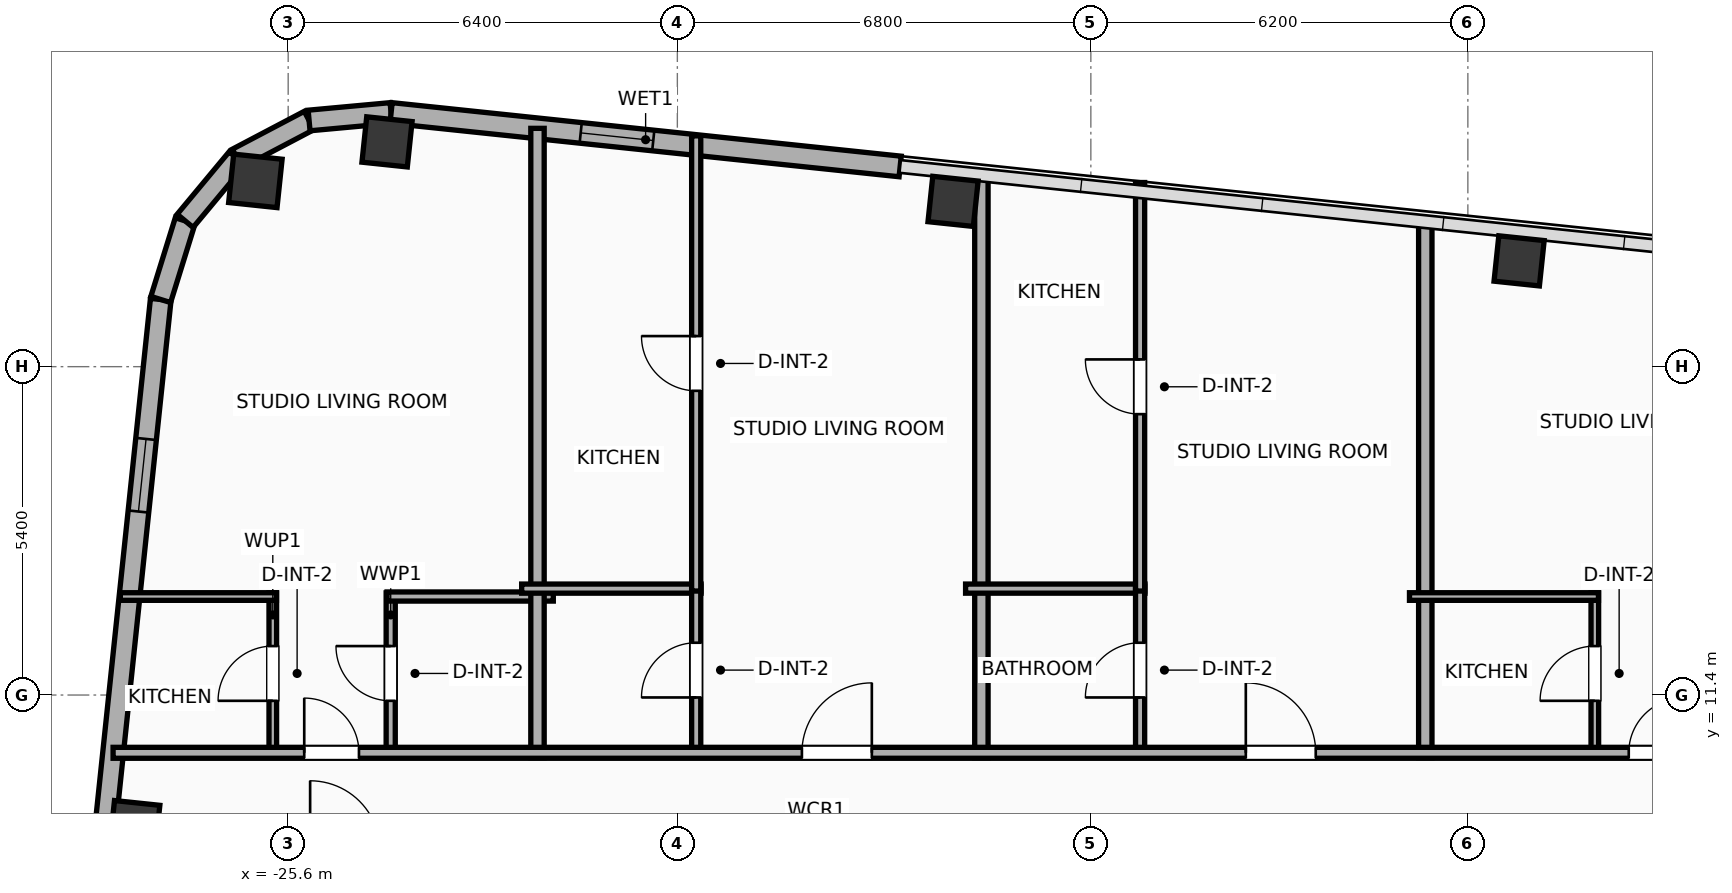
"""IFC4 building model, lengths in metres.
Left out: names, types, materials, properties, quantities, classifications, styles, units other than length and angle.
Written with IfcOpenShell. Run it as: python <this file> out.ifc"""

import sys

from ifc_helpers import new_model, si_unit, direction, frame, frame_2d, origin, origin_2d, place, context, subcontext, project, spatial, rectangle, hollow_rectangle, hollow_circle, extrude, element, fill, save


model = new_model("IFC4")
c1 = context("Model", 3, precision=1e-05, world=origin(), true_north=direction((0.0, 1.0)))
c2 = subcontext(c1, "Body", "Model", "MODEL_VIEW")
j1 = project(units=[si_unit("LENGTHUNIT", "METRE"), si_unit("PLANEANGLEUNIT", "RADIAN")], contexts=[c1])
p1 = place(None, origin())
s1 = spatial("IfcSite", under=j1, at=p1, CompositionType="ELEMENT")
p2 = place(p1, origin())
s2 = spatial("IfcBuilding", under=s1, at=p2, CompositionType="ELEMENT")
p3 = place(p2, frame((0.0, 0.0, 263.9)))
s3 = spatial("IfcBuildingStorey", under=s2, at=p3, CompositionType="ELEMENT", Elevation=263.9)
for number, where, z_axis, x_axis in (
    (1, (-5.357, 18.54, 0.0), (0.0, 0.0, 1.0), (0.995, -0.105, 0.0)),
    (2, (-14.666, 19.518, 0.0), (0.0, 0.0, 1.0), (0.995, -0.105, 0.0)),
    (3, (-23.975, 20.497, 0.0), (0.0, 0.0, 1.0), (0.995, -0.105, 0.0)),
):
    element("IfcColumn", number, at=place(p3, frame(where, z_axis=z_axis, x_axis=x_axis)), inside=s3, PredefinedType="COLUMN", context=c2, shape_type="SweptSolid", body=[
        extrude(hollow_rectangle(XDim=0.75, YDim=0.75, WallThickness=0.025, at=origin_2d()), origin(), (0.0, 0.0, 1.0), 3.9),
    ])
p4 = place(p3, frame((-26.139, 19.855, 0.0), z_axis=(0.0, 0.0, 1.0), x_axis=(0.994521895368, -0.104528463268, 0.0)))
e4 = element("IfcColumn", 4, at=p4, inside=s3, PredefinedType="COLUMN", context=c2, shape_type="SweptSolid", body=[
    extrude(hollow_circle(Radius=0.4, WallThickness=0.028, at=origin_2d()), origin(), (0.0, 0.0, 1.0), 3.9),
])
p5 = place(p3, frame((-28.123, 9.252, 0.0), z_axis=(0.0, 0.0, 1.0), x_axis=(0.994521895368, -0.104528463268, 0.0)))
e5 = element("IfcColumn", 5, at=p5, inside=s3, PredefinedType="COLUMN", context=c2, shape_type="SweptSolid", body=[
    extrude(hollow_rectangle(XDim=0.75, YDim=0.75, WallThickness=0.025, at=origin_2d()), origin(), (0.0, 0.0, 1.0), 3.9),
])
p6 = place(p3, frame((-30.87, -12.296, 0.0), z_axis=(0.0, 0.0, 1.0), x_axis=(0.104533282919, 0.994521388791, 0.0)))
e6 = element("IfcWall", 6, at=p6, inside=s3, PredefinedType="ELEMENTEDWALL", context=c2, shape_type="SweptSolid", body=[
    extrude(rectangle(XDim=30.366, YDim=0.34, at=frame_2d((15.183, 0.0))), origin(), (0.0, 0.0, 1.0), 3.65),
])
p7 = place(p6, frame((5.842, 0.0, 0.75)))
e7 = element("IfcOpeningElement", 7, at=p7, cuts=e6, PredefinedType="OPENING", context=c2, shape_type="SweptSolid", body=[
    extrude(rectangle(XDim=1.8, YDim=2.1, at=frame_2d((0.9, 1.05))), frame((0.0, 0.18, 0.0), z_axis=(0.0, -1.0, 0.0), x_axis=(1.0, 0.0, 0.0)), (0.0, 0.0, 1.0), 0.36),
])
p8 = place(p6, frame((26.861, 0.0, 0.75)))
e8 = element("IfcOpeningElement", 8, at=p8, cuts=e6, PredefinedType="OPENING", context=c2, shape_type="SweptSolid", body=[
    extrude(rectangle(XDim=1.2, YDim=2.05, at=frame_2d((0.6, 1.025))), frame((0.0, 0.18, 0.0), z_axis=(0.0, -1.0, 0.0), x_axis=(1.0, 0.0, 0.0)), (0.0, 0.0, 1.0), 0.36),
])
p9 = place(p6, frame((16.311, 0.0, 0.75)))
e9 = element("IfcOpeningElement", 9, at=p9, cuts=e6, PredefinedType="OPENING", context=c2, shape_type="SweptSolid", body=[
    extrude(rectangle(XDim=1.2, YDim=2.05, at=frame_2d((0.6, 1.025))), frame((0.0, 0.18, 0.0), z_axis=(0.0, -1.0, 0.0), x_axis=(1.0, 0.0, 0.0)), (0.0, 0.0, 1.0), 0.36),
])
p10 = place(p3, frame((-27.696, 17.905, 0.0), z_axis=(0.0, 0.0, 1.0), x_axis=(0.296416228123, 0.955058856671, 0.0)))
e10 = element("IfcWall", 10, at=p10, inside=s3, PredefinedType="ELEMENTEDWALL", context=c2, shape_type="SweptSolid", body=[
    extrude(rectangle(XDim=1.354, YDim=0.34, at=frame_2d((0.677, 0.0))), origin(), (0.0, 0.0, 1.0), 3.65),
])
p11 = place(p3, frame((-27.294, 19.198, 0.0), z_axis=(0.0, 0.0, 1.0), x_axis=(0.639501603217, 0.768789762863, 0.0)))
e11 = element("IfcWall", 11, at=p11, inside=s3, PredefinedType="ELEMENTEDWALL", context=c2, shape_type="SweptSolid", body=[
    extrude(rectangle(XDim=1.337, YDim=0.34, at=frame_2d((0.668, 0.0))), origin(), (0.0, 0.0, 1.0), 3.65),
])
p12 = place(p3, frame((-26.439, 20.226, 0.0), z_axis=(0.0, 0.0, 1.0), x_axis=(0.884922182678, 0.465738908193, 0.0)))
e12 = element("IfcWall", 12, at=p12, inside=s3, PredefinedType="ELEMENTEDWALL", context=c2, shape_type="SweptSolid", body=[
    extrude(rectangle(XDim=1.337, YDim=0.34, at=frame_2d((0.668, 0.0))), origin(), (0.0, 0.0, 1.0), 3.65),
])
p13 = place(p3, frame((-25.256, 20.848, 0.0), z_axis=(0.0, 0.0, 1.0), x_axis=(0.995813013343, 0.091413579172, 0.0)))
e13 = element("IfcWall", 13, at=p13, inside=s3, PredefinedType="ELEMENTEDWALL", context=c2, shape_type="SweptSolid", body=[
    extrude(rectangle(XDim=1.354, YDim=0.34, at=frame_2d((0.677, 0.0))), origin(), (0.0, 0.0, 1.0), 3.65),
])
p14 = place(p3, frame((-23.908, 20.972, 0.0), z_axis=(0.0, 0.0, 1.0), x_axis=(0.994522285292, -0.104524753323, 0.0)))
e14 = element("IfcWall", 14, at=p14, inside=s3, PredefinedType="ELEMENTEDWALL", context=c2, shape_type="SweptSolid", body=[
    extrude(rectangle(XDim=8.418, YDim=0.34, at=frame_2d((4.209, 0.0))), origin(), (0.0, 0.0, 1.0), 3.65),
])
p15 = place(p14, frame((3.135, 0.0, 0.75)))
e15 = element("IfcOpeningElement", 15, at=p15, cuts=e14, PredefinedType="OPENING", context=c2, shape_type="SweptSolid", body=[
    extrude(rectangle(XDim=1.2, YDim=2.05, at=frame_2d((0.6, 1.025))), frame((0.0, 0.18, 0.0), z_axis=(0.0, -1.0, 0.0), x_axis=(1.0, 0.0, 0.0)), (0.0, 0.0, 1.0), 0.36),
])
p16 = place(p3, frame((-25.853, 10.43, 0.0), z_axis=(0.0, 0.0, 1.0), x_axis=(0.0, 1.0, 0.0)))
e16 = element("IfcWall", 16, at=p16, inside=s3, PredefinedType="PARTITIONING", context=c2, shape_type="SweptSolid", body=[
    extrude(rectangle(XDim=2.65, YDim=0.125, at=frame_2d((1.325, 0.0))), origin(), (0.0, 0.0, 1.0), 3.65),
])
p17 = place(p16, frame((0.875, 0.0, 0.0)))
e17 = element("IfcOpeningElement", 17, at=p17, cuts=e16, PredefinedType="OPENING", context=c2, shape_type="SweptSolid", body=[
    extrude(rectangle(XDim=0.9, YDim=2.05, at=frame_2d((0.45, 1.025))), frame((0.0, 0.073, 0.0), z_axis=(0.0, -1.0, 0.0), x_axis=(1.0, 0.0, 0.0)), (0.0, 0.0, 1.0), 0.145),
])
p18 = place(p3, frame((-23.914, 10.43, 0.0), z_axis=(0.0, 0.0, 1.0), x_axis=(0.0, 1.0, 0.0)))
e18 = element("IfcWall", 18, at=p18, inside=s3, PredefinedType="PLUMBINGWALL", context=c2, shape_type="SweptSolid", body=[
    extrude(rectangle(XDim=2.65, YDim=0.15, at=frame_2d((1.325, 0.0))), origin(), (0.0, 0.0, 1.0), 3.65),
])
p19 = place(p18, frame((0.875, 0.0, 0.0)))
e19 = element("IfcOpeningElement", 19, at=p19, cuts=e18, PredefinedType="OPENING", context=c2, shape_type="SweptSolid", body=[
    extrude(rectangle(XDim=0.9, YDim=2.05, at=frame_2d((0.45, 1.025))), frame((0.0, 0.085, 0.0), z_axis=(0.0, -1.0, 0.0), x_axis=(1.0, 0.0, 0.0)), (0.0, 0.0, 1.0), 0.17),
])
p20 = place(p3, frame((-28.36, 13.02, 0.0), z_axis=(0.0, 0.0, 1.0), x_axis=(1.0, 0.0, 0.0)))
e20 = element("IfcWall", 20, at=p20, inside=s3, PredefinedType="PARTITIONING", context=c2, shape_type="SweptSolid", body=[
    extrude(rectangle(XDim=2.567, YDim=0.125, at=frame_2d((1.284, 0.0))), origin(), (0.0, 0.0, 1.0), 3.65),
])
p21 = place(p3, frame((-23.974, 13.02, 0.0), z_axis=(0.0, 0.0, 1.0), x_axis=(1.0, 0.0, 0.0)))
e21 = element("IfcWall", 21, at=p21, inside=s3, PredefinedType="PLUMBINGWALL", context=c2, shape_type="SweptSolid", body=[
    extrude(rectangle(XDim=2.734, YDim=0.15, at=frame_2d((1.367, 0.0))), origin(), (0.0, 0.0, 1.0), 3.65),
])
p22 = place(p3, frame((-21.5, 10.37, 0.0), z_axis=(0.0, 0.0, 1.0), x_axis=(0.0, 1.0, 0.0)))
e22 = element("IfcWall", 22, at=p22, inside=s3, PredefinedType="PARTITIONING", context=c2, shape_type="SweptSolid", body=[
    extrude(rectangle(XDim=10.349, YDim=0.22, at=frame_2d((5.174, 0.0))), origin(), (0.0, 0.0, 1.0), 3.09),
])
p23 = place(p3, frame((-21.76, 13.15, 0.0), z_axis=(0.0, 0.0, 1.0), x_axis=(1.0, 0.0, 0.0)))
e23 = element("IfcWall", 23, at=p23, inside=s3, PredefinedType="PLUMBINGWALL", context=c2, shape_type="SweptSolid", body=[
    extrude(rectangle(XDim=2.95, YDim=0.15, at=frame_2d((1.475, 0.0))), origin(), (0.0, 0.0, 1.0), 3.65),
])
p24 = place(p3, frame((-18.89, 10.43, 0.0), z_axis=(0.0, 0.0, 1.0), x_axis=(0.0, 1.0, 0.0)))
e24 = element("IfcWall", 24, at=p24, inside=s3, PredefinedType="PLUMBINGWALL", context=c2, shape_type="SweptSolid", body=[
    extrude(rectangle(XDim=2.76, YDim=0.15, at=frame_2d((1.38, 0.0))), origin(), (0.0, 0.0, 1.0), 3.65),
])
p25 = place(p24, frame((0.93, 0.0, 0.0)))
e25 = element("IfcOpeningElement", 25, at=p25, cuts=e24, PredefinedType="OPENING", context=c2, shape_type="SweptSolid", body=[
    extrude(rectangle(XDim=0.9, YDim=2.05, at=frame_2d((0.45, 1.025))), frame((0.0, 0.085, 0.0), z_axis=(0.0, -1.0, 0.0), x_axis=(1.0, 0.0, 0.0)), (0.0, 0.0, 1.0), 0.17),
])
p26 = place(p3, frame((-18.89, 13.11, 0.0), z_axis=(0.0, 0.0, 1.0), x_axis=(0.0, 1.0, 0.0)))
e26 = element("IfcWall", 26, at=p26, inside=s3, PredefinedType="PLUMBINGWALL", context=c2, shape_type="SweptSolid", body=[
    extrude(rectangle(XDim=7.486, YDim=0.15, at=frame_2d((3.743, 0.0))), origin(), (0.0, 0.0, 1.0), 3.65),
])
p27 = place(p26, frame((3.293, 0.0, 0.0)))
e27 = element("IfcOpeningElement", 27, at=p27, cuts=e26, PredefinedType="OPENING", context=c2, shape_type="SweptSolid", body=[
    extrude(rectangle(XDim=0.9, YDim=2.05, at=frame_2d((0.45, 1.025))), frame((0.0, 0.085, 0.0), z_axis=(0.0, -1.0, 0.0), x_axis=(1.0, 0.0, 0.0)), (0.0, 0.0, 1.0), 0.17),
])
p28 = place(p3, frame((-14.2, 10.37, 0.0), z_axis=(0.0, 0.0, 1.0), x_axis=(0.0, 1.0, 0.0)))
e28 = element("IfcWall", 28, at=p28, inside=s3, PredefinedType="PARTITIONING", context=c2, shape_type="SweptSolid", body=[
    extrude(rectangle(XDim=9.582, YDim=0.22, at=frame_2d((4.791, 0.0))), origin(), (0.0, 0.0, 1.0), 3.65),
])
p29 = place(p3, frame((-14.46, 13.15, 0.0), z_axis=(0.0, 0.0, 1.0), x_axis=(1.0, 0.0, 0.0)))
e29 = element("IfcWall", 29, at=p29, inside=s3, PredefinedType="PLUMBINGWALL", context=c2, shape_type="SweptSolid", body=[
    extrude(rectangle(XDim=2.95, YDim=0.15, at=frame_2d((1.475, 0.0))), origin(), (0.0, 0.0, 1.0), 3.65),
])
p30 = place(p3, frame((-11.59, 10.43, 0.0), z_axis=(0.0, 0.0, 1.0), x_axis=(0.0, 1.0, 0.0)))
e30 = element("IfcWall", 30, at=p30, inside=s3, PredefinedType="PLUMBINGWALL", context=c2, shape_type="SweptSolid", body=[
    extrude(rectangle(XDim=2.76, YDim=0.15, at=frame_2d((1.38, 0.0))), origin(), (0.0, 0.0, 1.0), 3.65),
])
p31 = place(p30, frame((0.93, 0.0, 0.0)))
e31 = element("IfcOpeningElement", 31, at=p31, cuts=e30, PredefinedType="OPENING", context=c2, shape_type="SweptSolid", body=[
    extrude(rectangle(XDim=0.9, YDim=2.05, at=frame_2d((0.45, 1.025))), frame((0.0, 0.085, 0.0), z_axis=(0.0, -1.0, 0.0), x_axis=(1.0, 0.0, 0.0)), (0.0, 0.0, 1.0), 0.17),
])
p32 = place(p3, frame((-11.59, 13.11, 0.0), z_axis=(0.0, 0.0, 1.0), x_axis=(0.0, 1.0, 0.0)))
e32 = element("IfcWall", 32, at=p32, inside=s3, PredefinedType="PLUMBINGWALL", context=c2, shape_type="SweptSolid", body=[
    extrude(rectangle(XDim=6.718, YDim=0.15, at=frame_2d((3.359, 0.0))), origin(), (0.0, 0.0, 1.0), 3.65),
])
p33 = place(p32, frame((2.909, 0.0, 0.0)))
e33 = element("IfcOpeningElement", 33, at=p33, cuts=e32, PredefinedType="OPENING", context=c2, shape_type="SweptSolid", body=[
    extrude(rectangle(XDim=0.9, YDim=2.05, at=frame_2d((0.45, 1.025))), frame((0.0, 0.085, 0.0), z_axis=(0.0, -1.0, 0.0), x_axis=(1.0, 0.0, 0.0)), (0.0, 0.0, 1.0), 0.17),
])
p34 = place(p3, frame((-6.9, 10.37, 0.0), z_axis=(0.0, 0.0, 1.0), x_axis=(0.0, 1.0, 0.0)))
e34 = element("IfcWall", 34, at=p34, inside=s3, PredefinedType="PARTITIONING", context=c2, shape_type="SweptSolid", body=[
    extrude(rectangle(XDim=8.814, YDim=0.22, at=frame_2d((4.407, 0.0))), origin(), (0.0, 0.0, 1.0), 3.65),
])
p35 = place(p3, frame((-4.112, 10.43, 0.0), z_axis=(0.0, 0.0, 1.0), x_axis=(0.0, 1.0, 0.0)))
e35 = element("IfcWall", 35, at=p35, inside=s3, PredefinedType="PARTITIONING", context=c2, shape_type="SweptSolid", body=[
    extrude(rectangle(XDim=2.65, YDim=0.125, at=frame_2d((1.325, 0.0))), origin(), (0.0, 0.0, 1.0), 3.65),
])
p36 = place(p35, frame((0.875, 0.0, 0.0)))
e36 = element("IfcOpeningElement", 36, at=p36, cuts=e35, PredefinedType="OPENING", context=c2, shape_type="SweptSolid", body=[
    extrude(rectangle(XDim=0.9, YDim=2.05, at=frame_2d((0.45, 1.025))), frame((0.0, 0.073, 0.0), z_axis=(0.0, -1.0, 0.0), x_axis=(1.0, 0.0, 0.0)), (0.0, 0.0, 1.0), 0.145),
])
p37 = place(p3, frame((-7.16, 13.02, 0.0), z_axis=(0.0, 0.0, 1.0), x_axis=(1.0, 0.0, 0.0)))
e37 = element("IfcWall", 37, at=p37, inside=s3, PredefinedType="PARTITIONING", context=c2, shape_type="SweptSolid", body=[
    extrude(rectangle(XDim=3.108, YDim=0.125, at=frame_2d((1.554, 0.0))), origin(), (0.0, 0.0, 1.0), 3.65),
])
p38 = place(p3, frame((-28.479, 10.45, 0.0), z_axis=(0.0, 0.0, 1.0), x_axis=(1.0, 0.0, 0.0)))
e38 = element("IfcWall", 38, at=p38, inside=s3, PredefinedType="PARTITIONING", context=c2, shape_type="SweptSolid", body=[
    extrude(rectangle(XDim=53.956, YDim=0.18, at=frame_2d((26.978, 0.0))), origin(), (0.0, 0.0, 1.0), 3.65),
])
p39 = place(p38, frame((3.143, 0.0, 0.0)))
e39 = element("IfcOpeningElement", 39, at=p39, cuts=e38, PredefinedType="OPENING", context=c2, shape_type="SweptSolid", body=[
    extrude(rectangle(XDim=0.9, YDim=2.05, at=frame_2d((0.45, 1.025))), frame((0.0, 0.1, 0.0), z_axis=(0.0, -1.0, 0.0), x_axis=(1.0, 0.0, 0.0)), (0.0, 0.0, 1.0), 0.2),
])
p40 = place(p38, frame((11.328, 0.0, 0.0)))
e40 = element("IfcOpeningElement", 40, at=p40, cuts=e38, PredefinedType="OPENING", context=c2, shape_type="SweptSolid", body=[
    extrude(rectangle(XDim=1.15, YDim=2.05, at=frame_2d((0.575, 1.025))), frame((0.0, 0.1, 0.0), z_axis=(0.0, -1.0, 0.0), x_axis=(1.0, 0.0, 0.0)), (0.0, 0.0, 1.0), 0.2),
])
p41 = place(p38, frame((18.628, 0.0, 0.0)))
e41 = element("IfcOpeningElement", 41, at=p41, cuts=e38, PredefinedType="OPENING", context=c2, shape_type="SweptSolid", body=[
    extrude(rectangle(XDim=1.15, YDim=2.05, at=frame_2d((0.575, 1.025))), frame((0.0, 0.1, 0.0), z_axis=(0.0, -1.0, 0.0), x_axis=(1.0, 0.0, 0.0)), (0.0, 0.0, 1.0), 0.2),
])
p42 = place(p38, frame((24.925, 0.0, 0.0)))
e42 = element("IfcOpeningElement", 42, at=p42, cuts=e38, PredefinedType="OPENING", context=c2, shape_type="SweptSolid", body=[
    extrude(rectangle(XDim=0.9, YDim=2.05, at=frame_2d((0.45, 1.025))), frame((0.0, 0.1, 0.0), z_axis=(0.0, -1.0, 0.0), x_axis=(1.0, 0.0, 0.0)), (0.0, 0.0, 1.0), 0.2),
])
p43 = place(p38, frame((31.955, 0.0, 0.0)))
e43 = element("IfcOpeningElement", 43, at=p43, cuts=e38, PredefinedType="OPENING", context=c2, shape_type="SweptSolid", body=[
    extrude(rectangle(XDim=1.15, YDim=2.05, at=frame_2d((0.575, 1.025))), frame((0.0, 0.1, 0.0), z_axis=(0.0, -1.0, 0.0), x_axis=(1.0, 0.0, 0.0)), (0.0, 0.0, 1.0), 0.2),
])
p44 = place(p38, frame((39.52, 0.0, 0.0)))
e44 = element("IfcOpeningElement", 44, at=p44, cuts=e38, PredefinedType="OPENING", context=c2, shape_type="SweptSolid", body=[
    extrude(rectangle(XDim=0.9, YDim=2.05, at=frame_2d((0.45, 1.025))), frame((0.0, 0.1, 0.0), z_axis=(0.0, -1.0, 0.0), x_axis=(1.0, 0.0, 0.0)), (0.0, 0.0, 1.0), 0.2),
])
p45 = place(p38, frame((48.487, 0.0, 0.0)))
e45 = element("IfcOpeningElement", 45, at=p45, cuts=e38, PredefinedType="OPENING", context=c2, shape_type="SweptSolid", body=[
    extrude(rectangle(XDim=1.15, YDim=2.05, at=frame_2d((0.575, 1.025))), frame((0.0, 0.1, 0.0), z_axis=(0.0, -1.0, 0.0), x_axis=(1.0, 0.0, 0.0)), (0.0, 0.0, 1.0), 0.2),
])
p46 = place(p8, origin())
e46 = element("IfcWindow", 46, at=p46, inside=s3, PartitioningType="SINGLE_PANEL", PredefinedType="WINDOW", context=c2, shape_type="SweptSolid", body=[
    extrude(rectangle(XDim=1.2, YDim=2.05, at=frame_2d((0.6, 1.025))), frame((0.0, 0.03, 0.0), z_axis=(0.0, -1.0, 0.0), x_axis=(1.0, 0.0, 0.0)), (0.0, 0.0, 1.0), 0.06),
])
fill(e8, e46)
p47 = place(p15, origin())
e47 = element("IfcWindow", 47, at=p47, inside=s3, PartitioningType="SINGLE_PANEL", PredefinedType="WINDOW", context=c2, shape_type="SweptSolid", body=[
    extrude(rectangle(XDim=1.2, YDim=2.05, at=frame_2d((0.6, 1.025))), frame((0.0, 0.03, 0.0), z_axis=(0.0, -1.0, 0.0), x_axis=(1.0, 0.0, 0.0)), (0.0, 0.0, 1.0), 0.06),
])
fill(e15, e47)
p48 = place(p17, origin())
e48 = element("IfcDoor", 48, at=p48, inside=s3, OperationType="SINGLE_SWING_LEFT", PredefinedType="DOOR", context=c2, shape_type="SweptSolid", body=[
    extrude(rectangle(XDim=0.9, YDim=2.05, at=frame_2d((0.45, 1.025))), frame((0.0, 0.025, 0.0), z_axis=(0.0, -1.0, 0.0), x_axis=(1.0, 0.0, 0.0)), (0.0, 0.0, 1.0), 0.05),
])
fill(e17, e48)
p49 = place(p19, origin())
e49 = element("IfcDoor", 49, at=p49, inside=s3, OperationType="SINGLE_SWING_RIGHT", PredefinedType="DOOR", context=c2, shape_type="SweptSolid", body=[
    extrude(rectangle(XDim=0.9, YDim=2.05, at=frame_2d((0.45, 1.025))), frame((0.0, 0.025, 0.0), z_axis=(0.0, -1.0, 0.0), x_axis=(1.0, 0.0, 0.0)), (0.0, 0.0, 1.0), 0.05),
])
fill(e19, e49)
p50 = place(p25, origin())
e50 = element("IfcDoor", 50, at=p50, inside=s3, OperationType="SINGLE_SWING_LEFT", PredefinedType="DOOR", context=c2, shape_type="SweptSolid", body=[
    extrude(rectangle(XDim=0.9, YDim=2.05, at=frame_2d((0.45, 1.025))), frame((0.0, 0.025, 0.0), z_axis=(0.0, -1.0, 0.0), x_axis=(1.0, 0.0, 0.0)), (0.0, 0.0, 1.0), 0.05),
])
fill(e25, e50)
p51 = place(p27, origin())
e51 = element("IfcDoor", 51, at=p51, inside=s3, OperationType="SINGLE_SWING_RIGHT", PredefinedType="DOOR", context=c2, shape_type="SweptSolid", body=[
    extrude(rectangle(XDim=0.9, YDim=2.05, at=frame_2d((0.45, 1.025))), frame((0.0, 0.025, 0.0), z_axis=(0.0, -1.0, 0.0), x_axis=(1.0, 0.0, 0.0)), (0.0, 0.0, 1.0), 0.05),
])
fill(e27, e51)
p52 = place(p31, origin())
e52 = element("IfcDoor", 52, at=p52, inside=s3, OperationType="SINGLE_SWING_LEFT", PredefinedType="DOOR", context=c2, shape_type="SweptSolid", body=[
    extrude(rectangle(XDim=0.9, YDim=2.05, at=frame_2d((0.45, 1.025))), frame((0.0, 0.025, 0.0), z_axis=(0.0, -1.0, 0.0), x_axis=(1.0, 0.0, 0.0)), (0.0, 0.0, 1.0), 0.05),
])
fill(e31, e52)
p53 = place(p33, origin())
e53 = element("IfcDoor", 53, at=p53, inside=s3, OperationType="SINGLE_SWING_RIGHT", PredefinedType="DOOR", context=c2, shape_type="SweptSolid", body=[
    extrude(rectangle(XDim=0.9, YDim=2.05, at=frame_2d((0.45, 1.025))), frame((0.0, 0.025, 0.0), z_axis=(0.0, -1.0, 0.0), x_axis=(1.0, 0.0, 0.0)), (0.0, 0.0, 1.0), 0.05),
])
fill(e33, e53)
p54 = place(p36, origin())
e54 = element("IfcDoor", 54, at=p54, inside=s3, OperationType="SINGLE_SWING_LEFT", PredefinedType="DOOR", context=c2, shape_type="SweptSolid", body=[
    extrude(rectangle(XDim=0.9, YDim=2.05, at=frame_2d((0.45, 1.025))), frame((0.0, 0.025, 0.0), z_axis=(0.0, -1.0, 0.0), x_axis=(1.0, 0.0, 0.0)), (0.0, 0.0, 1.0), 0.05),
])
fill(e36, e54)
p55 = place(p39, origin())
e55 = element("IfcDoor", 55, at=p55, inside=s3, OperationType="SINGLE_SWING_LEFT", PredefinedType="DOOR", context=c2, shape_type="SweptSolid", body=[
    extrude(rectangle(XDim=0.9, YDim=2.05, at=frame_2d((0.45, 1.025))), frame((0.0, 0.025, 0.0), z_axis=(0.0, -1.0, 0.0), x_axis=(1.0, 0.0, 0.0)), (0.0, 0.0, 1.0), 0.05),
])
fill(e39, e55)
p56 = place(p40, origin())
e56 = element("IfcDoor", 56, at=p56, inside=s3, OperationType="SINGLE_SWING_RIGHT", PredefinedType="DOOR", context=c2, shape_type="SweptSolid", body=[
    extrude(rectangle(XDim=1.15, YDim=2.05, at=frame_2d((0.575, 1.025))), frame((0.0, 0.025, 0.0), z_axis=(0.0, -1.0, 0.0), x_axis=(1.0, 0.0, 0.0)), (0.0, 0.0, 1.0), 0.05),
])
fill(e40, e56)
p57 = place(p41, origin())
e57 = element("IfcDoor", 57, at=p57, inside=s3, OperationType="SINGLE_SWING_LEFT", PredefinedType="DOOR", context=c2, shape_type="SweptSolid", body=[
    extrude(rectangle(XDim=1.15, YDim=2.05, at=frame_2d((0.575, 1.025))), frame((0.0, 0.025, 0.0), z_axis=(0.0, -1.0, 0.0), x_axis=(1.0, 0.0, 0.0)), (0.0, 0.0, 1.0), 0.05),
])
fill(e41, e57)
p58 = place(p42, origin())
e58 = element("IfcDoor", 58, at=p58, inside=s3, OperationType="SINGLE_SWING_RIGHT", PredefinedType="DOOR", context=c2, shape_type="SweptSolid", body=[
    extrude(rectangle(XDim=0.9, YDim=2.05, at=frame_2d((0.45, 1.025))), frame((0.0, 0.025, 0.0), z_axis=(0.0, -1.0, 0.0), x_axis=(1.0, 0.0, 0.0)), (0.0, 0.0, 1.0), 0.05),
])
fill(e42, e58)
save(model, sys.argv[1])
